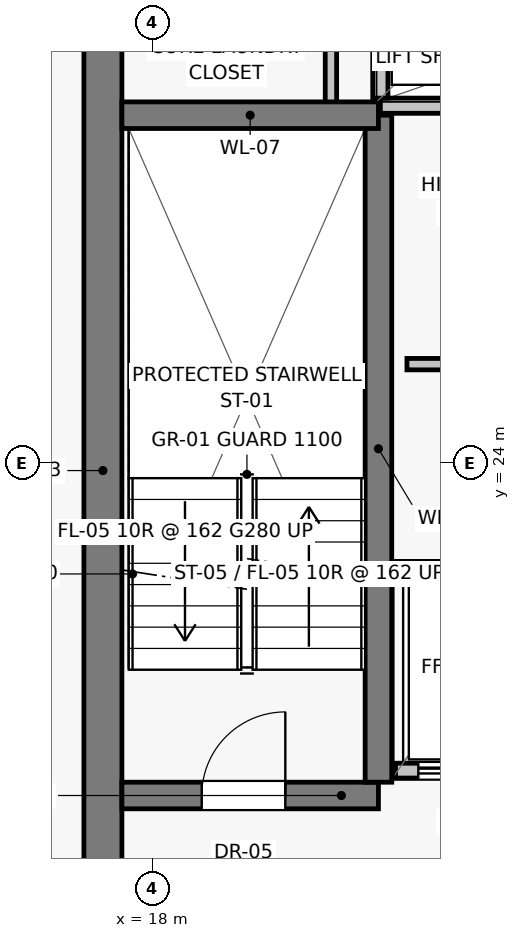
"""IFC4 building model, lengths in metres.
Left out: names, types, materials, properties, quantities, classifications, styles, units other than length and angle.
Written with IfcOpenShell. Run it as: python <this file> out.ifc"""

import sys

from ifc_helpers import new_model, si_unit, direction, frame, frame_2d, origin, place, context, subcontext, project, spatial, rectangle, extrude, source, transform, mapped, element, fill, save


model = new_model("IFC4")
c1 = context("Model", 3, precision=1e-05, world=origin(), true_north=direction((0.0, 1.0)))
c2 = subcontext(c1, "Body", "Model", "MODEL_VIEW")
j1 = project(units=[si_unit("LENGTHUNIT", "METRE"), si_unit("PLANEANGLEUNIT", "RADIAN")], contexts=[c1])
p1 = place(None, origin())
s1 = spatial("IfcSite", under=j1, at=p1, CompositionType="ELEMENT")
p2 = place(p1, origin())
s2 = spatial("IfcBuilding", under=s1, at=p2, CompositionType="ELEMENT")
p3 = place(p2, frame((0.0, 0.0, 248.0)))
s3 = spatial("IfcBuildingStorey", under=s2, at=p3, CompositionType="ELEMENT", Elevation=248.0)
p4 = place(p3, frame((17.35, 16.8, 0.0), z_axis=(0.0, 0.0, 1.0), x_axis=(0.0, 1.0, 0.0)))
e1 = element("IfcWall", 1, at=p4, inside=s3, PredefinedType="SHEAR", context=c2, shape_type="SweptSolid", body=[
    extrude(rectangle(XDim=14.2, YDim=0.5, at=frame_2d((7.1, 0.0))), origin(), (0.0, 0.0, 1.0), 3.015),
])
p5 = place(p3, frame((20.35, 28.65, 0.0), z_axis=(0.0, 0.0, 1.0), x_axis=(0.0, 1.0, 0.0)))
e2 = element("IfcWall", 2, at=p5, inside=s3, PredefinedType="PARTITIONING", context=c2, shape_type="SweptSolid", body=[
    extrude(rectangle(XDim=2.2, YDim=0.15, at=frame_2d((1.1, 0.0))), origin(), (0.0, 0.0, 1.0), 3.015),
])
p6 = place(p3, frame((17.6, 19.625, 0.0), z_axis=(0.0, 0.0, 1.0), x_axis=(1.0, 0.0, 0.0)))
e3 = element("IfcWall", 3, at=p6, inside=s3, PredefinedType="SHEAR", context=c2, shape_type="SweptSolid", body=[
    extrude(rectangle(XDim=3.375, YDim=0.35, at=frame_2d((1.688, 0.0))), origin(), (0.0, 0.0, 1.0), 3.015),
])
p7 = place(p6, frame((1.05, 0.0, 0.0)))
e4 = element("IfcOpeningElement", 4, at=p7, cuts=e3, PredefinedType="OPENING", context=c2, shape_type="SweptSolid", body=[
    extrude(rectangle(XDim=1.1, YDim=2.03, at=frame_2d((0.55, 1.015))), frame((0.0, 0.185, 0.0), z_axis=(0.0, -1.0, 0.0), x_axis=(1.0, 0.0, 0.0)), (0.0, 0.0, 1.0), 0.37),
])
p8 = place(p3, frame((21.2, 19.95, 0.0), z_axis=(0.0, 0.0, 1.0), x_axis=(1.0, 0.0, 0.0)))
e5 = element("IfcWall", 5, at=p8, inside=s3, PredefinedType="SOLIDWALL", context=c2, shape_type="SweptSolid", body=[
    extrude(rectangle(XDim=1.85, YDim=0.2, at=frame_2d((0.925, 0.0))), origin(), (0.0, 0.0, 1.0), 3.015),
])
p9 = place(p8, frame((0.3, 0.0, 0.0)))
e6 = element("IfcOpeningElement", 6, at=p9, cuts=e5, PredefinedType="OPENING", context=c2, shape_type="SweptSolid", body=[
    extrude(rectangle(XDim=1.3, YDim=2.25, at=frame_2d((0.65, 1.125))), frame((0.0, 0.11, 0.0), z_axis=(0.0, -1.0, 0.0), x_axis=(1.0, 0.0, 0.0)), (0.0, 0.0, 1.0), 0.22),
])
p10 = place(p3, frame((20.975, 19.8, 0.0), z_axis=(0.0, 0.0, 1.0), x_axis=(0.0, 1.0, 0.0)))
e7 = element("IfcWall", 7, at=p10, inside=s3, PredefinedType="SHEAR", context=c2, shape_type="SweptSolid", body=[
    extrude(rectangle(XDim=8.775, YDim=0.35, at=frame_2d((4.387, 0.0))), origin(), (0.0, 0.0, 1.0), 3.015),
])
p11 = place(p3, frame((17.6, 28.575, 0.0), z_axis=(0.0, 0.0, 1.0), x_axis=(1.0, 0.0, 0.0)))
e8 = element("IfcWall", 8, at=p11, inside=s3, PredefinedType="SHEAR", context=c2, shape_type="SweptSolid", body=[
    extrude(rectangle(XDim=3.375, YDim=0.35, at=frame_2d((1.688, 0.0))), origin(), (0.0, 0.0, 1.0), 3.015),
])
p12 = place(p3, frame((21.2, 22.6, 0.0), z_axis=(0.0, 0.0, 1.0), x_axis=(1.0, 0.0, 0.0)))
e9 = element("IfcWall", 9, at=p12, inside=s3, PredefinedType="SOLIDWALL", context=c2, shape_type="SweptSolid", body=[
    extrude(rectangle(XDim=1.85, YDim=0.2, at=frame_2d((0.925, 0.0))), origin(), (0.0, 0.0, 1.0), 3.015),
])
p13 = place(p3, frame((21.0, 28.7, 0.0), z_axis=(0.0, 0.0, 1.0), x_axis=(1.0, 0.0, 0.0)))
e10 = element("IfcWall", 10, at=p13, inside=s3, PredefinedType="SOLIDWALL", context=c2, shape_type="SweptSolid", body=[
    extrude(rectangle(XDim=6.0, YDim=0.2, at=frame_2d((3.0, 0.0))), origin(), (0.0, 0.0, 1.0), 3.015),
])
p14 = place(p3, frame((21.0, 28.8, 0.0), z_axis=(0.0, 0.0, 1.0), x_axis=(0.0, 1.0, 0.0)))
e11 = element("IfcWall", 11, at=p14, inside=s3, PredefinedType="SOLIDWALL", context=c2, shape_type="SweptSolid", body=[
    extrude(rectangle(XDim=1.6, YDim=0.2, at=frame_2d((0.8, 0.0))), origin(), (0.0, 0.0, 1.0), 3.015),
])
p15 = place(p3, frame((21.35, 25.3, 0.0), z_axis=(0.0, 0.0, 1.0), x_axis=(1.0, 0.0, 0.0)))
e12 = element("IfcWall", 12, at=p15, inside=s3, PredefinedType="PARTITIONING", context=c2, shape_type="SweptSolid", body=[
    extrude(rectangle(XDim=2.55, YDim=0.15, at=frame_2d((1.275, 0.0))), origin(), (0.0, 0.0, 1.0), 3.015),
])
p16 = place(p15, frame((0.8, 0.0, 0.0)))
e13 = element("IfcOpeningElement", 13, at=p16, cuts=e12, PredefinedType="OPENING", context=c2, shape_type="SweptSolid", body=[
    extrude(rectangle(XDim=0.86, YDim=2.01, at=frame_2d((0.43, 1.005))), frame((0.0, 0.085, 0.0), z_axis=(0.0, -1.0, 0.0), x_axis=(1.0, 0.0, 0.0)), (0.0, 0.0, 1.0), 0.17),
])
m1 = source(origin(), c2, "Body", "SweptSolid", [
    extrude(rectangle(XDim=1.1, YDim=2.03, at=frame_2d((0.55, 1.015))), frame((0.0, 0.025, 0.0), z_axis=(0.0, -1.0, 0.0), x_axis=(1.0, 0.0, 0.0)), (0.0, 0.0, 1.0), 0.05),
])
p17 = place(p7, origin())
e14 = element("IfcDoor", 14, at=p17, inside=s3, OperationType="SINGLE_SWING_RIGHT", PredefinedType="DOOR", context=c2, shape_type="MappedRepresentation", body=[
    mapped(m1, transform((0.0, 0.0, 0.0), scale=1.0)),
])
fill(e4, e14)
m2 = source(origin(), c2, "Body", "SweptSolid", [
    extrude(rectangle(XDim=1.3, YDim=2.25, at=frame_2d((0.65, 1.125))), frame((0.0, 0.025, 0.0), z_axis=(0.0, -1.0, 0.0), x_axis=(1.0, 0.0, 0.0)), (0.0, 0.0, 1.0), 0.05),
])
p18 = place(p9, origin())
e15 = element("IfcDoor", 15, at=p18, inside=s3, OperationType="SLIDING_TO_LEFT", PredefinedType="DOOR", context=c2, shape_type="MappedRepresentation", body=[
    mapped(m2, transform((0.0, 0.0, 0.0), scale=1.0)),
])
fill(e6, e15)
save(model, sys.argv[1])
